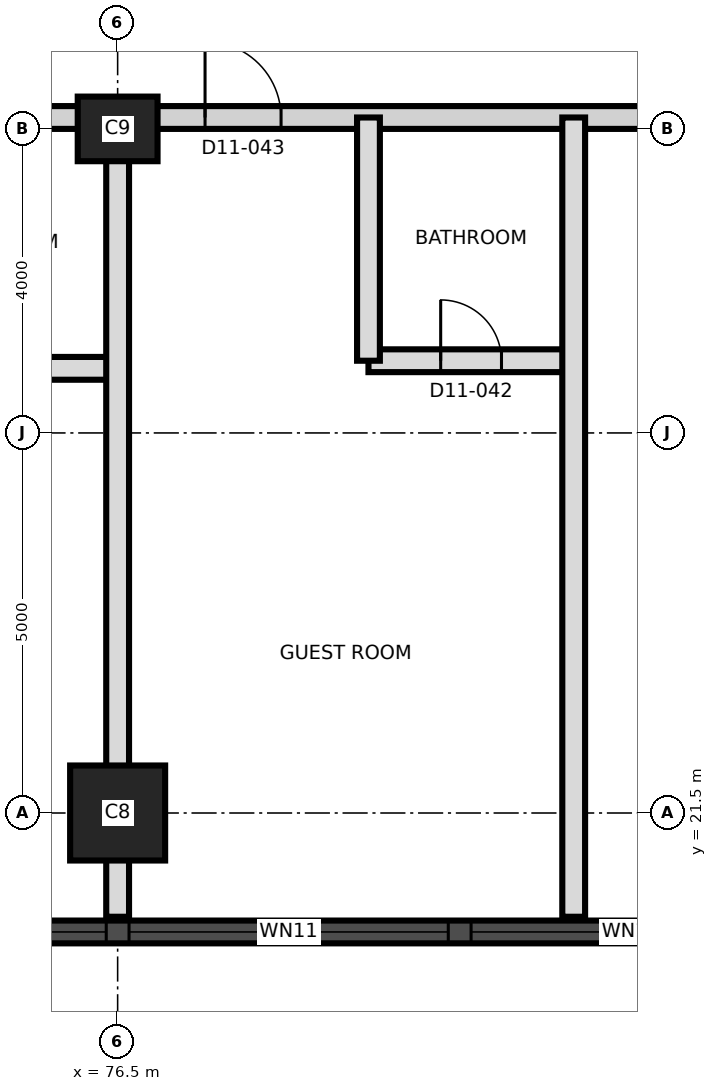
"""IFC4 building model, lengths in metres.
Left out: names, types, materials, properties, quantities, classifications, styles, units other than length and angle.
Written with IfcOpenShell. Run it as: python <this file> out.ifc"""

import sys

from ifc_helpers import new_model, si_unit, direction, frame, frame_2d, origin, origin_2d, place, context, subcontext, project, spatial, rectangle, extrude, element, fill, save


model = new_model("IFC4")
c1 = context("Model", 3, precision=1e-05, world=origin(), true_north=direction((0.0, 1.0)))
c2 = subcontext(c1, "Body", "Model", "MODEL_VIEW")
j1 = project(units=[si_unit("LENGTHUNIT", "METRE"), si_unit("PLANEANGLEUNIT", "RADIAN")], contexts=[c1])
p1 = place(None, origin())
s1 = spatial("IfcSite", under=j1, at=p1, CompositionType="ELEMENT")
p2 = place(p1, origin())
s2 = spatial("IfcBuilding", under=s1, at=p2, CompositionType="ELEMENT")
p3 = place(p2, frame((0.0, 0.0, 127.8)))
s3 = spatial("IfcBuildingStorey", under=s2, at=p3, CompositionType="ELEMENT", Elevation=127.8)
p4 = place(p3, frame((76.5, 21.5, 0.0), z_axis=(0.0, 0.0, 1.0), x_axis=(1.0, 0.0, 0.0)))
e1 = element("IfcColumn", 1, at=p4, inside=s3, PredefinedType="COLUMN", context=c2, shape_type="SweptSolid", body=[
    extrude(rectangle(XDim=1.25, YDim=1.25, at=origin_2d()), origin(), (0.0, 0.0, 1.0), 3.7),
])
p5 = place(p3, frame((76.5, 30.5, 0.0), z_axis=(0.0, 0.0, 1.0), x_axis=(1.0, 0.0, 0.0)))
e2 = element("IfcColumn", 2, at=p5, inside=s3, PredefinedType="COLUMN", context=c2, shape_type="SweptSolid", body=[
    extrude(rectangle(XDim=1.05, YDim=0.85, at=origin_2d()), origin(), (0.0, 0.0, 1.0), 3.7),
])
p6 = place(p3, frame((44.01, 19.935, 0.0), z_axis=(0.0, 0.0, 1.0), x_axis=(1.0, 0.0, 0.0)))
e3 = element("IfcWall", 3, at=p6, inside=s3, PredefinedType="SOLIDWALL", context=c2, shape_type="SweptSolid", body=[
    extrude(rectangle(XDim=43.477, YDim=0.3, at=frame_2d((21.738, 0.0))), origin(), (0.0, 0.0, 1.0), 3.4),
])
p7 = place(p6, frame((1.845, 0.0, 0.3)))
e4 = element("IfcOpeningElement", 4, at=p7, cuts=e3, PredefinedType="OPENING", context=c2, shape_type="SweptSolid", body=[
    extrude(rectangle(XDim=1.8, YDim=2.4, at=frame_2d((0.9, 1.2))), frame((0.0, 0.16, 0.0), z_axis=(0.0, -1.0, 0.0), x_axis=(1.0, 0.0, 0.0)), (0.0, 0.0, 1.0), 0.32),
])
p8 = place(p6, frame((5.64, 0.0, 0.9)))
e5 = element("IfcOpeningElement", 5, at=p8, cuts=e3, PredefinedType="OPENING", context=c2, shape_type="SweptSolid", body=[
    extrude(rectangle(XDim=4.2, YDim=1.5, at=frame_2d((2.1, 0.75))), frame((0.0, 0.16, 0.0), z_axis=(0.0, -1.0, 0.0), x_axis=(1.0, 0.0, 0.0)), (0.0, 0.0, 1.0), 0.32),
])
p9 = place(p6, frame((10.14, 0.0, 0.9)))
e6 = element("IfcOpeningElement", 6, at=p9, cuts=e3, PredefinedType="OPENING", context=c2, shape_type="SweptSolid", body=[
    extrude(rectangle(XDim=4.2, YDim=1.5, at=frame_2d((2.1, 0.75))), frame((0.0, 0.16, 0.0), z_axis=(0.0, -1.0, 0.0), x_axis=(1.0, 0.0, 0.0)), (0.0, 0.0, 1.0), 0.32),
])
p10 = place(p6, frame((14.64, 0.0, 0.9)))
e7 = element("IfcOpeningElement", 7, at=p10, cuts=e3, PredefinedType="OPENING", context=c2, shape_type="SweptSolid", body=[
    extrude(rectangle(XDim=4.2, YDim=1.5, at=frame_2d((2.1, 0.75))), frame((0.0, 0.16, 0.0), z_axis=(0.0, -1.0, 0.0), x_axis=(1.0, 0.0, 0.0)), (0.0, 0.0, 1.0), 0.32),
])
p11 = place(p6, frame((19.14, 0.0, 0.9)))
e8 = element("IfcOpeningElement", 8, at=p11, cuts=e3, PredefinedType="OPENING", context=c2, shape_type="SweptSolid", body=[
    extrude(rectangle(XDim=4.2, YDim=1.5, at=frame_2d((2.1, 0.75))), frame((0.0, 0.16, 0.0), z_axis=(0.0, -1.0, 0.0), x_axis=(1.0, 0.0, 0.0)), (0.0, 0.0, 1.0), 0.32),
])
p12 = place(p6, frame((23.64, 0.0, 0.9)))
e9 = element("IfcOpeningElement", 9, at=p12, cuts=e3, PredefinedType="OPENING", context=c2, shape_type="SweptSolid", body=[
    extrude(rectangle(XDim=4.2, YDim=1.5, at=frame_2d((2.1, 0.75))), frame((0.0, 0.16, 0.0), z_axis=(0.0, -1.0, 0.0), x_axis=(1.0, 0.0, 0.0)), (0.0, 0.0, 1.0), 0.32),
])
p13 = place(p6, frame((28.14, 0.0, 0.9)))
e10 = element("IfcOpeningElement", 10, at=p13, cuts=e3, PredefinedType="OPENING", context=c2, shape_type="SweptSolid", body=[
    extrude(rectangle(XDim=4.2, YDim=1.5, at=frame_2d((2.1, 0.75))), frame((0.0, 0.16, 0.0), z_axis=(0.0, -1.0, 0.0), x_axis=(1.0, 0.0, 0.0)), (0.0, 0.0, 1.0), 0.32),
])
p14 = place(p6, frame((32.64, 0.0, 0.9)))
e11 = element("IfcOpeningElement", 11, at=p14, cuts=e3, PredefinedType="OPENING", context=c2, shape_type="SweptSolid", body=[
    extrude(rectangle(XDim=4.2, YDim=1.5, at=frame_2d((2.1, 0.75))), frame((0.0, 0.16, 0.0), z_axis=(0.0, -1.0, 0.0), x_axis=(1.0, 0.0, 0.0)), (0.0, 0.0, 1.0), 0.32),
])
p15 = place(p6, frame((37.14, 0.0, 0.9)))
e12 = element("IfcOpeningElement", 12, at=p15, cuts=e3, PredefinedType="OPENING", context=c2, shape_type="SweptSolid", body=[
    extrude(rectangle(XDim=4.2, YDim=1.5, at=frame_2d((2.1, 0.75))), frame((0.0, 0.16, 0.0), z_axis=(0.0, -1.0, 0.0), x_axis=(1.0, 0.0, 0.0)), (0.0, 0.0, 1.0), 0.32),
])
p16 = place(p3, frame((73.5, 27.35, 0.0), z_axis=(0.0, 0.0, 1.0), x_axis=(1.0, 0.0, 0.0)))
e13 = element("IfcWall", 13, at=p16, inside=s3, PredefinedType="PARTITIONING", context=c2, shape_type="SweptSolid", body=[
    extrude(rectangle(XDim=3.0, YDim=0.3, at=frame_2d((1.5, 0.0))), origin(), (0.0, 0.0, 1.0), 3.4),
])
p17 = place(p16, frame((1.1, 0.0, 0.0)))
e14 = element("IfcOpeningElement", 14, at=p17, cuts=e13, PredefinedType="OPENING", context=c2, shape_type="SweptSolid", body=[
    extrude(rectangle(XDim=0.8, YDim=2.1, at=frame_2d((0.4, 1.05))), frame((0.0, 0.16, 0.0), z_axis=(0.0, -1.0, 0.0), x_axis=(1.0, 0.0, 0.0)), (0.0, 0.0, 1.0), 0.32),
])
p18 = place(p3, frame((79.8, 27.45, 0.0), z_axis=(0.0, 0.0, 1.0), x_axis=(1.0, 0.0, 0.0)))
e15 = element("IfcWall", 15, at=p18, inside=s3, PredefinedType="PARTITIONING", context=c2, shape_type="SweptSolid", body=[
    extrude(rectangle(XDim=2.7, YDim=0.3, at=frame_2d((1.35, 0.0))), origin(), (0.0, 0.0, 1.0), 3.4),
])
p19 = place(p18, frame((0.95, 0.0, 0.0)))
e16 = element("IfcOpeningElement", 16, at=p19, cuts=e15, PredefinedType="OPENING", context=c2, shape_type="SweptSolid", body=[
    extrude(rectangle(XDim=0.8, YDim=2.1, at=frame_2d((0.4, 1.05))), frame((0.0, 0.16, 0.0), z_axis=(0.0, -1.0, 0.0), x_axis=(1.0, 0.0, 0.0)), (0.0, 0.0, 1.0), 0.32),
])
p20 = place(p3, frame((58.8, 30.65, 0.0), z_axis=(0.0, 0.0, 1.0), x_axis=(1.0, 0.0, 0.0)))
e17 = element("IfcWall", 17, at=p20, inside=s3, PredefinedType="PARTITIONING", context=c2, shape_type="SweptSolid", body=[
    extrude(rectangle(XDim=26.53, YDim=0.3, at=frame_2d((13.265, 0.0))), origin(), (0.0, 0.0, 1.0), 3.4),
])
p21 = place(p20, frame((3.115, 0.0, 0.0)))
e18 = element("IfcOpeningElement", 18, at=p21, cuts=e17, PredefinedType="OPENING", context=c2, shape_type="SweptSolid", body=[
    extrude(rectangle(XDim=1.0, YDim=2.1, at=frame_2d((0.5, 1.05))), frame((0.0, 0.16, 0.0), z_axis=(0.0, -1.0, 0.0), x_axis=(1.0, 0.0, 0.0)), (0.0, 0.0, 1.0), 0.32),
])
p22 = place(p20, frame((6.065, 0.0, 0.0)))
e19 = element("IfcOpeningElement", 19, at=p22, cuts=e17, PredefinedType="OPENING", context=c2, shape_type="SweptSolid", body=[
    extrude(rectangle(XDim=1.4, YDim=2.1, at=frame_2d((0.7, 1.05))), frame((0.0, 0.16, 0.0), z_axis=(0.0, -1.0, 0.0), x_axis=(1.0, 0.0, 0.0)), (0.0, 0.0, 1.0), 0.32),
])
p23 = place(p20, frame((12.7, 0.0, 0.0)))
e20 = element("IfcOpeningElement", 20, at=p23, cuts=e17, PredefinedType="OPENING", context=c2, shape_type="SweptSolid", body=[
    extrude(rectangle(XDim=1.0, YDim=2.4, at=frame_2d((0.5, 1.2))), frame((0.0, 0.16, 0.0), z_axis=(0.0, -1.0, 0.0), x_axis=(1.0, 0.0, 0.0)), (0.0, 0.0, 1.0), 0.32),
])
p24 = place(p20, frame((18.85, 0.0, 0.0)))
e21 = element("IfcOpeningElement", 21, at=p24, cuts=e17, PredefinedType="OPENING", context=c2, shape_type="SweptSolid", body=[
    extrude(rectangle(XDim=1.0, YDim=2.1, at=frame_2d((0.5, 1.05))), frame((0.0, 0.16, 0.0), z_axis=(0.0, -1.0, 0.0), x_axis=(1.0, 0.0, 0.0)), (0.0, 0.0, 1.0), 0.32),
])
p25 = place(p20, frame((24.7, 0.0, 0.0)))
e22 = element("IfcOpeningElement", 22, at=p25, cuts=e17, PredefinedType="OPENING", context=c2, shape_type="SweptSolid", body=[
    extrude(rectangle(XDim=1.0, YDim=2.1, at=frame_2d((0.5, 1.05))), frame((0.0, 0.16, 0.0), z_axis=(0.0, -1.0, 0.0), x_axis=(1.0, 0.0, 0.0)), (0.0, 0.0, 1.0), 0.32),
])
p26 = place(p3, frame((76.5, 20.135, 0.0), z_axis=(0.0, 0.0, 1.0), x_axis=(0.0, 1.0, 0.0)))
e23 = element("IfcWall", 23, at=p26, inside=s3, PredefinedType="PARTITIONING", context=c2, shape_type="SweptSolid", body=[
    extrude(rectangle(XDim=10.515, YDim=0.3, at=frame_2d((5.257, 0.0))), origin(), (0.0, 0.0, 1.0), 3.4),
])
p27 = place(p3, frame((79.8, 27.45, 0.0), z_axis=(0.0, 0.0, 1.0), x_axis=(0.0, 1.0, 0.0)))
e24 = element("IfcWall", 24, at=p27, inside=s3, PredefinedType="PARTITIONING", context=c2, shape_type="SweptSolid", body=[
    extrude(rectangle(XDim=3.2, YDim=0.3, at=frame_2d((1.6, 0.0))), origin(), (0.0, 0.0, 1.0), 3.4),
])
p28 = place(p3, frame((82.5, 20.135, 0.0), z_axis=(0.0, 0.0, 1.0), x_axis=(0.0, 1.0, 0.0)))
e25 = element("IfcWall", 25, at=p28, inside=s3, PredefinedType="PARTITIONING", context=c2, shape_type="SweptSolid", body=[
    extrude(rectangle(XDim=10.515, YDim=0.3, at=frame_2d((5.257, 0.0))), origin(), (0.0, 0.0, 1.0), 3.4),
])
p29 = place(p13, origin())
e26 = element("IfcWindow", 26, at=p29, inside=s3, PartitioningType="SINGLE_PANEL", PredefinedType="WINDOW", context=c2, shape_type="SweptSolid", body=[
    extrude(rectangle(XDim=4.2, YDim=1.5, at=frame_2d((2.1, 0.75))), frame((0.0, 0.03, 0.0), z_axis=(0.0, -1.0, 0.0), x_axis=(1.0, 0.0, 0.0)), (0.0, 0.0, 1.0), 0.06),
])
fill(e10, e26)
p30 = place(p14, origin())
e27 = element("IfcWindow", 27, at=p30, inside=s3, PartitioningType="SINGLE_PANEL", PredefinedType="WINDOW", context=c2, shape_type="SweptSolid", body=[
    extrude(rectangle(XDim=4.2, YDim=1.5, at=frame_2d((2.1, 0.75))), frame((0.0, 0.03, 0.0), z_axis=(0.0, -1.0, 0.0), x_axis=(1.0, 0.0, 0.0)), (0.0, 0.0, 1.0), 0.06),
])
fill(e11, e27)
p31 = place(p15, origin())
e28 = element("IfcWindow", 28, at=p31, inside=s3, PartitioningType="SINGLE_PANEL", PredefinedType="WINDOW", context=c2, shape_type="SweptSolid", body=[
    extrude(rectangle(XDim=4.2, YDim=1.5, at=frame_2d((2.1, 0.75))), frame((0.0, 0.03, 0.0), z_axis=(0.0, -1.0, 0.0), x_axis=(1.0, 0.0, 0.0)), (0.0, 0.0, 1.0), 0.06),
])
fill(e12, e28)
p32 = place(p19, origin())
e29 = element("IfcDoor", 29, at=p32, inside=s3, OperationType="SINGLE_SWING_LEFT", PredefinedType="DOOR", context=c2, shape_type="SweptSolid", body=[
    extrude(rectangle(XDim=0.8, YDim=2.1, at=frame_2d((0.4, 1.05))), frame((0.0, 0.025, 0.0), z_axis=(0.0, -1.0, 0.0), x_axis=(1.0, 0.0, 0.0)), (0.0, 0.0, 1.0), 0.05),
])
fill(e16, e29)
p33 = place(p24, origin())
e30 = element("IfcDoor", 30, at=p33, inside=s3, OperationType="SINGLE_SWING_LEFT", PredefinedType="DOOR", context=c2, shape_type="SweptSolid", body=[
    extrude(rectangle(XDim=1.0, YDim=2.1, at=frame_2d((0.5, 1.05))), frame((0.0, 0.025, 0.0), z_axis=(0.0, -1.0, 0.0), x_axis=(1.0, 0.0, 0.0)), (0.0, 0.0, 1.0), 0.05),
])
fill(e21, e30)
save(model, sys.argv[1])
